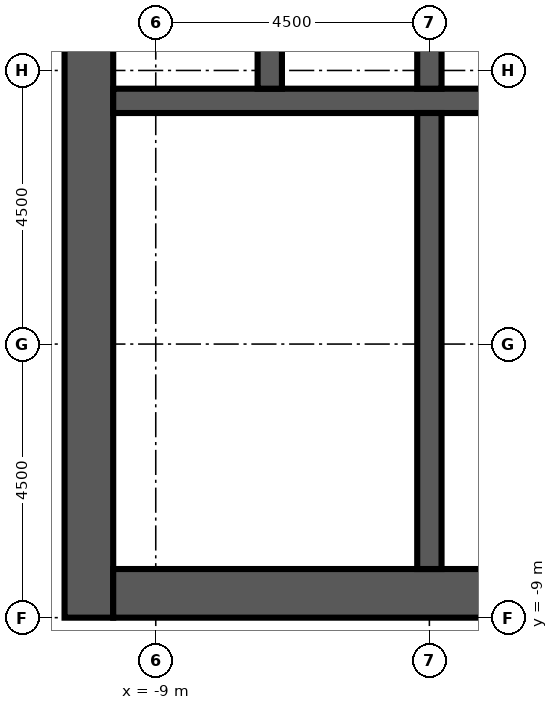
"""IFC4 building model, lengths in metres.
Left out: names, types, materials, properties, quantities, classifications, styles, units other than length and angle.
Written with IfcOpenShell. Run it as: python <this file> out.ifc"""

import sys

from ifc_helpers import new_model, si_unit, direction, frame, frame_2d, origin, place, context, subcontext, project, spatial, rectangle, extrude, element, fill, save


model = new_model("IFC4")
c1 = context("Model", 3, precision=1e-05, world=origin(), true_north=direction((0.0, 1.0)))
c2 = subcontext(c1, "Body", "Model", "MODEL_VIEW")
j1 = project(units=[si_unit("LENGTHUNIT", "METRE"), si_unit("PLANEANGLEUNIT", "RADIAN")], contexts=[c1])
p1 = place(None, origin())
s1 = spatial("IfcSite", under=j1, at=p1, CompositionType="ELEMENT")
p2 = place(p1, origin())
s2 = spatial("IfcBuilding", under=s1, at=p2, CompositionType="ELEMENT")
p3 = place(p2, frame((0.0, 0.0, 151.4)))
s3 = spatial("IfcBuildingStorey", under=s2, at=p3, CompositionType="ELEMENT", Elevation=151.4)
p4 = place(p3, frame((-10.1, -9.0, 0.0), z_axis=(0.0, 0.0, 1.0), x_axis=(0.0, 1.0, 0.0)))
e1 = element("IfcWall", 1, at=p4, inside=s3, PredefinedType="SHEAR", context=c2, shape_type="SweptSolid", body=[
    extrude(rectangle(XDim=27.5, YDim=0.8, at=frame_2d((13.75, 0.0))), origin(), (0.0, 0.0, 1.0), 5.4),
])
p5 = place(p4, frame((12.55, 0.0, 0.0)))
e2 = element("IfcOpeningElement", 2, at=p5, cuts=e1, PredefinedType="OPENING", context=c2, shape_type="SweptSolid", body=[
    extrude(rectangle(XDim=2.4, YDim=2.4, at=frame_2d((1.2, 1.2))), frame((0.0, 0.41, 0.0), z_axis=(0.0, -1.0, 0.0), x_axis=(1.0, 0.0, 0.0)), (0.0, 0.0, 1.0), 0.82),
])
p6 = place(p4, frame((6.825, 0.0, 0.0)))
e3 = element("IfcOpeningElement", 3, at=p6, cuts=e1, PredefinedType="OPENING", context=c2, shape_type="SweptSolid", body=[
    extrude(rectangle(XDim=1.2, YDim=2.1, at=frame_2d((0.6, 1.05))), frame((0.0, 0.41, 0.0), z_axis=(0.0, -1.0, 0.0), x_axis=(1.0, 0.0, 0.0)), (0.0, 0.0, 1.0), 0.82),
])
p7 = place(p4, frame((19.475, 0.0, 0.0)))
e4 = element("IfcOpeningElement", 4, at=p7, cuts=e1, PredefinedType="OPENING", context=c2, shape_type="SweptSolid", body=[
    extrude(rectangle(XDim=1.2, YDim=2.1, at=frame_2d((0.6, 1.05))), frame((0.0, 0.41, 0.0), z_axis=(0.0, -1.0, 0.0), x_axis=(1.0, 0.0, 0.0)), (0.0, 0.0, 1.0), 0.82),
])
p8 = place(p3, frame((-9.7, -8.6, 0.0), z_axis=(0.0, 0.0, 1.0), x_axis=(1.0, 0.0, 0.0)))
e5 = element("IfcWall", 5, at=p8, inside=s3, PredefinedType="SHEAR", context=c2, shape_type="SweptSolid", body=[
    extrude(rectangle(XDim=10.4, YDim=0.8, at=frame_2d((5.2, 0.0))), origin(), (0.0, 0.0, 1.0), 5.4),
])
p9 = place(p3, frame((-9.7, -0.5, 0.0), z_axis=(0.0, 0.0, 1.0), x_axis=(1.0, 0.0, 0.0)))
e6 = element("IfcWall", 6, at=p9, inside=s3, PredefinedType="SHEAR", context=c2, shape_type="SweptSolid", body=[
    extrude(rectangle(XDim=10.4, YDim=0.4, at=frame_2d((5.2, 0.0))), origin(), (0.0, 0.0, 1.0), 5.4),
])
for number, where, z_axis, x_axis in (
    (7, (-7.125, -0.3, 0.0), (0.0, 0.0, 1.0), (0.0, 1.0, 0.0)),
    (8, (-4.5, -0.3, 0.0), (0.0, 0.0, 1.0), (0.0, 1.0, 0.0)),
):
    element("IfcWall", number, at=place(p3, frame(where, z_axis=z_axis, x_axis=x_axis)), inside=s3, PredefinedType="SHEAR", context=c2, shape_type="SweptSolid", body=[
        extrude(rectangle(XDim=2.9, YDim=0.4, at=frame_2d((1.45, 0.0))), origin(), (0.0, 0.0, 1.0), 5.4),
    ])
p10 = place(p3, frame((-4.5, -8.2, 0.0), z_axis=(0.0, 0.0, 1.0), x_axis=(0.0, 1.0, 0.0)))
e9 = element("IfcWall", 9, at=p10, inside=s3, PredefinedType="SHEAR", context=c2, shape_type="SweptSolid", body=[
    extrude(rectangle(XDim=7.5, YDim=0.4, at=frame_2d((3.75, 0.0))), origin(), (0.0, 0.0, 1.0), 5.4),
])
for number, where, z_axis, x_axis in (
    (10, (-4.3, -5.2, 0.0), (0.0, 0.0, 1.0), (1.0, 0.0, 0.0)),
    (11, (-4.3, -2.95, 0.0), (0.0, 0.0, 1.0), (1.0, 0.0, 0.0)),
):
    element("IfcWall", number, at=place(p3, frame(where, z_axis=z_axis, x_axis=x_axis)), inside=s3, PredefinedType="PARTITIONING", context=c2, shape_type="SweptSolid", body=[
        extrude(rectangle(XDim=3.5, YDim=0.1, at=frame_2d((1.75, 0.0))), origin(), (0.0, 0.0, 1.0), 4.95),
    ])
p11 = place(p6, origin())
e12 = element("IfcDoor", 12, at=p11, inside=s3, OperationType="SINGLE_SWING_LEFT", PredefinedType="DOOR", context=c2, shape_type="SweptSolid", body=[
    extrude(rectangle(XDim=1.2, YDim=2.1, at=frame_2d((0.6, 1.05))), frame((0.0, 0.025, 0.0), z_axis=(0.0, -1.0, 0.0), x_axis=(1.0, 0.0, 0.0)), (0.0, 0.0, 1.0), 0.05),
])
fill(e3, e12)
save(model, sys.argv[1])
